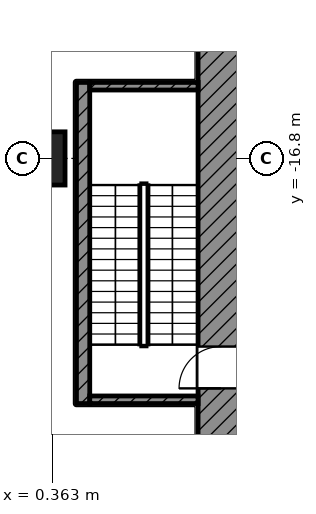
"""IFC4 building model, lengths in metres.
Left out: names, types, materials, properties, quantities, classifications, styles, units other than length and angle.
Written with IfcOpenShell. Run it as: python <this file> out.ifc"""

import sys

from ifc_helpers import new_model, si_unit, direction, frame, frame_2d, origin, origin_2d, place, context, subcontext, project, spatial, rectangle, extrude, element, fill, save


model = new_model("IFC4")
c1 = context("Model", 3, precision=1e-05, world=origin(), true_north=direction((0.0, 1.0)))
c2 = subcontext(c1, "Body", "Model", "MODEL_VIEW")
j1 = project(units=[si_unit("LENGTHUNIT", "METRE"), si_unit("PLANEANGLEUNIT", "RADIAN")], contexts=[c1])
p1 = place(None, origin())
s1 = spatial("IfcSite", under=j1, at=p1, CompositionType="ELEMENT")
p2 = place(p1, origin())
s2 = spatial("IfcBuilding", under=s1, at=p2, CompositionType="ELEMENT")
p3 = place(p2, frame((0.0, 0.0, 7.0)))
s3 = spatial("IfcBuildingStorey", under=s2, at=p3, CompositionType="ELEMENT", Elevation=7.0)
p4 = place(p3, frame((0.0, -16.8, 0.0), z_axis=(0.0, 0.0, 1.0), x_axis=(1.0, 0.0, 0.0)))
e1 = element("IfcColumn", 1, at=p4, inside=s3, PredefinedType="COLUMN", context=c2, shape_type="SweptSolid", body=[
    extrude(rectangle(XDim=1.4, YDim=1.4, at=origin_2d()), origin(), (0.0, 0.0, 1.0), 5.6),
])
p5 = place(p3, frame((4.8, -25.2, 0.0), z_axis=(0.0, 0.0, 1.0), x_axis=(0.0, 1.0, 0.0)))
e2 = element("IfcWall", 2, at=p5, inside=s3, PredefinedType="SHEAR", context=c2, shape_type="SweptSolid", body=[
    extrude(rectangle(XDim=19.8, YDim=1.2, at=frame_2d((9.9, 0.0))), origin(), (0.0, 0.0, 1.0), 5.25),
])
p6 = place(p5, frame((11.65, 0.0, 0.0)))
e3 = element("IfcOpeningElement", 3, at=p6, cuts=e2, PredefinedType="OPENING", context=c2, shape_type="SweptSolid", body=[
    extrude(rectangle(XDim=1.1, YDim=2.1, at=frame_2d((0.55, 1.05))), frame((0.0, 0.61, 0.0), z_axis=(0.0, -1.0, 0.0), x_axis=(1.0, 0.0, 0.0)), (0.0, 0.0, 1.0), 1.22),
])
p7 = place(p5, frame((2.35, 0.0, 0.0)))
e4 = element("IfcOpeningElement", 4, at=p7, cuts=e2, PredefinedType="OPENING", context=c2, shape_type="SweptSolid", body=[
    extrude(rectangle(XDim=1.1, YDim=2.1, at=frame_2d((0.55, 1.05))), frame((0.0, 0.61, 0.0), z_axis=(0.0, -1.0, 0.0), x_axis=(1.0, 0.0, 0.0)), (0.0, 0.0, 1.0), 1.22),
])
p8 = place(p3, frame((1.175, -23.25, 0.0), z_axis=(0.0, 0.0, 1.0), x_axis=(0.0, 1.0, 0.0)))
e5 = element("IfcWall", 5, at=p8, inside=s3, PredefinedType="SHEAR", context=c2, shape_type="SweptSolid", body=[
    extrude(rectangle(XDim=8.45, YDim=0.35, at=frame_2d((4.225, 0.0))), origin(), (0.0, 0.0, 1.0), 5.25),
])
for number, where, z_axis, x_axis in (
    (6, (1.35, -14.9, 0.0), (0.0, 0.0, 1.0), (1.0, 0.0, 0.0)),
    (7, (1.35, -23.15, 0.0), (0.0, 0.0, 1.0), (1.0, 0.0, 0.0)),
):
    element("IfcWall", number, at=place(p3, frame(where, z_axis=z_axis, x_axis=x_axis)), inside=s3, PredefinedType="SHEAR", context=c2, shape_type="SweptSolid", body=[
        extrude(rectangle(XDim=2.85, YDim=0.2, at=frame_2d((1.425, 0.0))), origin(), (0.0, 0.0, 1.0), 5.25),
    ])
p9 = place(p7, origin())
e8 = element("IfcDoor", 8, at=p9, inside=s3, OperationType="SINGLE_SWING_LEFT", PredefinedType="DOOR", context=c2, shape_type="SweptSolid", body=[
    extrude(rectangle(XDim=1.1, YDim=2.1, at=frame_2d((0.55, 1.05))), frame((0.0, 0.025, 0.0), z_axis=(0.0, -1.0, 0.0), x_axis=(1.0, 0.0, 0.0)), (0.0, 0.0, 1.0), 0.05),
])
fill(e4, e8)
save(model, sys.argv[1])
